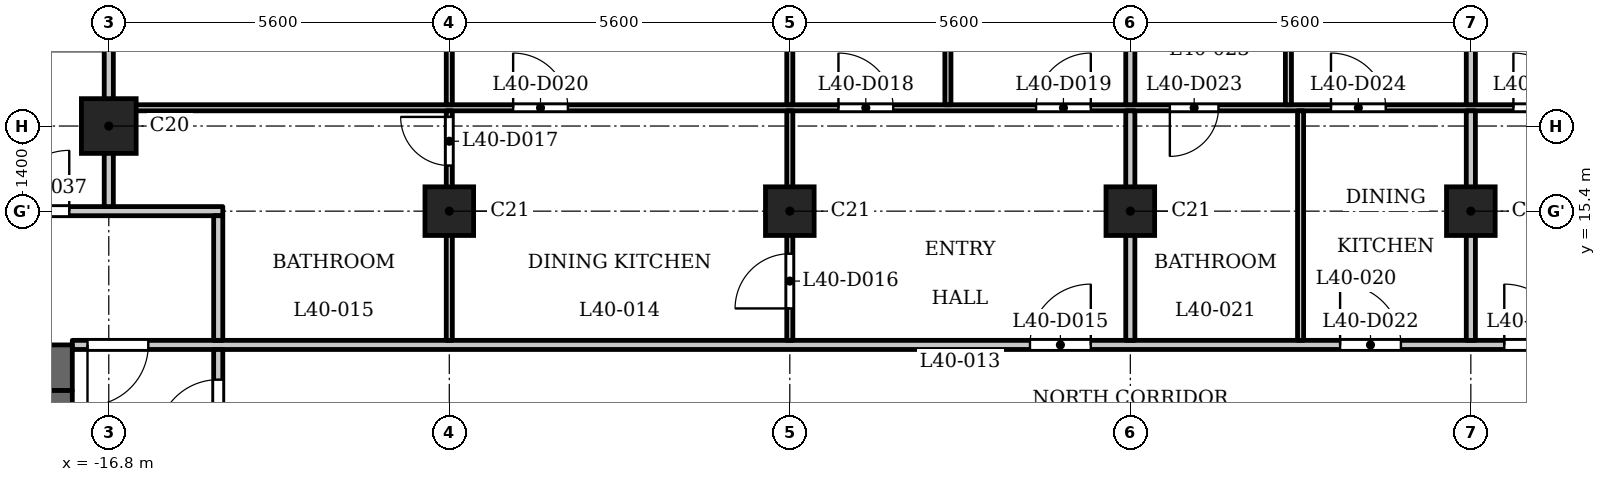
"""IFC4 building model, lengths in metres.
Left out: names, types, materials, properties, quantities, classifications, styles, units other than length and angle.
Written with IfcOpenShell. Run it as: python <this file> out.ifc"""

import sys

from ifc_helpers import new_model, si_unit, direction, frame, frame_2d, origin, origin_2d, place, context, subcontext, project, spatial, rectangle, extrude, element, fill, save


model = new_model("IFC4")
c1 = context("Model", 3, precision=1e-05, world=origin(), true_north=direction((0.0, 1.0)))
c2 = subcontext(c1, "Body", "Model", "MODEL_VIEW")
j1 = project(units=[si_unit("LENGTHUNIT", "METRE"), si_unit("PLANEANGLEUNIT", "RADIAN")], contexts=[c1])
p1 = place(None, origin())
s1 = spatial("IfcSite", under=j1, at=p1, CompositionType="ELEMENT")
p2 = place(p1, origin())
s2 = spatial("IfcBuilding", under=s1, at=p2, CompositionType="ELEMENT")
p3 = place(p2, frame((0.0, 0.0, 157.1)))
s3 = spatial("IfcBuildingStorey", under=s2, at=p3, CompositionType="ELEMENT", Elevation=157.1)
p4 = place(p3, frame((-16.8, 16.8, 0.0), z_axis=(0.0, 0.0, 1.0), x_axis=(1.0, 0.0, 0.0)))
e1 = element("IfcColumn", 1, at=p4, inside=s3, PredefinedType="COLUMN", context=c2, shape_type="SweptSolid", body=[
    extrude(rectangle(XDim=0.9, YDim=0.9, at=origin_2d()), origin(), (0.0, 0.0, 1.0), 3.5),
])
for number, where, z_axis, x_axis in (
    (2, (-11.2, 15.4, 0.0), (0.0, 0.0, 1.0), (1.0, 0.0, 0.0)),
    (3, (-5.6, 15.4, 0.0), (0.0, 0.0, 1.0), (1.0, 0.0, 0.0)),
    (4, (0.0, 15.4, 0.0), (0.0, 0.0, 1.0), (1.0, 0.0, 0.0)),
    (5, (5.6, 15.4, 0.0), (0.0, 0.0, 1.0), (1.0, 0.0, 0.0)),
):
    element("IfcColumn", number, at=place(p3, frame(where, z_axis=z_axis, x_axis=x_axis)), inside=s3, PredefinedType="COLUMN", context=c2, shape_type="SweptSolid", body=[
        extrude(rectangle(XDim=0.8, YDim=0.8, at=origin_2d()), origin(), (0.0, 0.0, 1.0), 3.5),
    ])
p5 = place(p3, frame((-17.4, 12.825, 0.0), z_axis=(0.0, 0.0, 1.0), x_axis=(-1.0, 0.0, 0.0)))
e6 = element("IfcWall", 6, at=p5, inside=s3, PredefinedType="SHEAR", context=c2, shape_type="SweptSolid", body=[
    extrude(rectangle(XDim=10.4, YDim=0.75, at=frame_2d((5.2, 0.0))), origin(), (0.0, 0.0, 1.0), 3.2),
])
p6 = place(p3, frame((-17.6, -12.45, 0.0), z_axis=(0.0, 0.0, 1.0), x_axis=(0.0, 1.0, 0.0)))
e7 = element("IfcWall", 7, at=p6, inside=s3, PredefinedType="SHEAR", context=c2, shape_type="SweptSolid", body=[
    extrude(rectangle(XDim=24.9, YDim=0.4, at=frame_2d((12.45, 0.0))), origin(), (0.0, 0.0, 1.0), 3.2),
])
p7 = place(p6, frame((8.65, 0.0, 0.0)))
e8 = element("IfcOpeningElement", 8, at=p7, cuts=e7, PredefinedType="OPENING", context=c2, shape_type="SweptSolid", body=[
    extrude(rectangle(XDim=0.9, YDim=2.1, at=frame_2d((0.45, 1.05))), frame((0.0, 0.21, 0.0), z_axis=(0.0, -1.0, 0.0), x_axis=(1.0, 0.0, 0.0)), (0.0, 0.0, 1.0), 0.42),
])
p8 = place(p6, frame((15.6, 0.0, 0.0)))
e9 = element("IfcOpeningElement", 9, at=p8, cuts=e7, PredefinedType="OPENING", context=c2, shape_type="SweptSolid", body=[
    extrude(rectangle(XDim=1.1, YDim=2.1, at=frame_2d((0.55, 1.05))), frame((0.0, 0.21, 0.0), z_axis=(0.0, -1.0, 0.0), x_axis=(1.0, 0.0, 0.0)), (0.0, 0.0, 1.0), 0.42),
])
p9 = place(p6, frame((18.0, 0.0, 0.0)))
e10 = element("IfcOpeningElement", 10, at=p9, cuts=e7, PredefinedType="OPENING", context=c2, shape_type="SweptSolid", body=[
    extrude(rectangle(XDim=1.1, YDim=2.1, at=frame_2d((0.55, 1.05))), frame((0.0, 0.21, 0.0), z_axis=(0.0, -1.0, 0.0), x_axis=(1.0, 0.0, 0.0)), (0.0, 0.0, 1.0), 0.42),
])
p10 = place(p6, frame((23.025, 0.0, 0.0)))
e11 = element("IfcOpeningElement", 11, at=p10, cuts=e7, PredefinedType="OPENING", context=c2, shape_type="SweptSolid", body=[
    extrude(rectangle(XDim=1.1, YDim=2.1, at=frame_2d((0.55, 1.05))), frame((0.0, 0.21, 0.0), z_axis=(0.0, -1.0, 0.0), x_axis=(1.0, 0.0, 0.0)), (0.0, 0.0, 1.0), 0.42),
])
p11 = place(p6, frame((0.775, 0.0, 0.0)))
e12 = element("IfcOpeningElement", 12, at=p11, cuts=e7, PredefinedType="OPENING", context=c2, shape_type="SweptSolid", body=[
    extrude(rectangle(XDim=1.1, YDim=2.1, at=frame_2d((0.55, 1.05))), frame((0.0, 0.21, 0.0), z_axis=(0.0, -1.0, 0.0), x_axis=(1.0, 0.0, 0.0)), (0.0, 0.0, 1.0), 0.42),
])
p12 = place(p6, frame((12.925, 0.0, 0.0)))
e13 = element("IfcOpeningElement", 13, at=p12, cuts=e7, PredefinedType="OPENING", context=c2, shape_type="SweptSolid", body=[
    extrude(rectangle(XDim=1.8, YDim=2.1, at=frame_2d((0.9, 1.05))), frame((0.0, 0.21, 0.0), z_axis=(0.0, -1.0, 0.0), x_axis=(1.0, 0.0, 0.0)), (0.0, 0.0, 1.0), 0.42),
])
p13 = place(p3, frame((-17.4, 13.2, 0.0), z_axis=(0.0, 0.0, 1.0), x_axis=(1.0, 0.0, 0.0)))
e14 = element("IfcWall", 14, at=p13, inside=s3, PredefinedType="PARTITIONING", context=c2, shape_type="SweptSolid", body=[
    extrude(rectangle(XDim=34.8, YDim=0.15, at=frame_2d((17.4, 0.0))), origin(), (0.0, 0.0, 1.0), 3.2),
])
p14 = place(p13, frame((0.25, 0.0, 0.0)))
e15 = element("IfcOpeningElement", 15, at=p14, cuts=e14, PredefinedType="OPENING", context=c2, shape_type="SweptSolid", body=[
    extrude(rectangle(XDim=1.0, YDim=2.1, at=frame_2d((0.5, 1.05))), frame((0.0, 0.085, 0.0), z_axis=(0.0, -1.0, 0.0), x_axis=(1.0, 0.0, 0.0)), (0.0, 0.0, 1.0), 0.17),
])
p15 = place(p13, frame((33.65, 0.0, 0.0)))
e16 = element("IfcOpeningElement", 16, at=p15, cuts=e14, PredefinedType="OPENING", context=c2, shape_type="SweptSolid", body=[
    extrude(rectangle(XDim=1.0, YDim=2.1, at=frame_2d((0.5, 1.05))), frame((0.0, 0.085, 0.0), z_axis=(0.0, -1.0, 0.0), x_axis=(1.0, 0.0, 0.0)), (0.0, 0.0, 1.0), 0.17),
])
p16 = place(p13, frame((15.75, 0.0, 0.0)))
e17 = element("IfcOpeningElement", 17, at=p16, cuts=e14, PredefinedType="OPENING", context=c2, shape_type="SweptSolid", body=[
    extrude(rectangle(XDim=1.0, YDim=2.1, at=frame_2d((0.5, 1.05))), frame((0.0, 0.085, 0.0), z_axis=(0.0, -1.0, 0.0), x_axis=(1.0, 0.0, 0.0)), (0.0, 0.0, 1.0), 0.17),
])
p17 = place(p13, frame((20.85, 0.0, 0.0)))
e18 = element("IfcOpeningElement", 18, at=p17, cuts=e14, PredefinedType="OPENING", context=c2, shape_type="SweptSolid", body=[
    extrude(rectangle(XDim=1.0, YDim=2.1, at=frame_2d((0.5, 1.05))), frame((0.0, 0.085, 0.0), z_axis=(0.0, -1.0, 0.0), x_axis=(1.0, 0.0, 0.0)), (0.0, 0.0, 1.0), 0.17),
])
p18 = place(p13, frame((23.55, 0.0, 0.0)))
e19 = element("IfcOpeningElement", 19, at=p18, cuts=e14, PredefinedType="OPENING", context=c2, shape_type="SweptSolid", body=[
    extrude(rectangle(XDim=1.0, YDim=2.1, at=frame_2d((0.5, 1.05))), frame((0.0, 0.085, 0.0), z_axis=(0.0, -1.0, 0.0), x_axis=(1.0, 0.0, 0.0)), (0.0, 0.0, 1.0), 0.17),
])
p19 = place(p3, frame((-27.484, 15.4, 0.0), z_axis=(0.0, 0.0, 1.0), x_axis=(1.0, 0.0, 0.0)))
e20 = element("IfcWall", 20, at=p19, inside=s3, PredefinedType="PARTITIONING", context=c2, shape_type="SweptSolid", body=[
    extrude(rectangle(XDim=12.559, YDim=0.15, at=frame_2d((6.279, 0.0))), origin(), (0.0, 0.0, 1.0), 3.2),
])
p20 = place(p19, frame((9.034, 0.0, 0.0)))
e21 = element("IfcOpeningElement", 21, at=p20, cuts=e20, PredefinedType="OPENING", context=c2, shape_type="SweptSolid", body=[
    extrude(rectangle(XDim=1.0, YDim=2.1, at=frame_2d((0.5, 1.05))), frame((0.0, 0.085, 0.0), z_axis=(0.0, -1.0, 0.0), x_axis=(1.0, 0.0, 0.0)), (0.0, 0.0, 1.0), 0.17),
])
p21 = place(p3, frame((-16.725, 17.1, 0.0), z_axis=(0.0, 0.0, 1.0), x_axis=(1.0, 0.0, 0.0)))
e22 = element("IfcWall", 22, at=p21, inside=s3, PredefinedType="PARTITIONING", context=c2, shape_type="SweptSolid", body=[
    extrude(rectangle(XDim=33.45, YDim=0.1, at=frame_2d((16.725, 0.0))), origin(), (0.0, 0.0, 1.0), 3.2),
])
p22 = place(p21, frame((11.925, 0.0, 0.0)))
e23 = element("IfcOpeningElement", 23, at=p22, cuts=e22, PredefinedType="OPENING", context=c2, shape_type="SweptSolid", body=[
    extrude(rectangle(XDim=0.9, YDim=2.1, at=frame_2d((0.45, 1.05))), frame((0.0, 0.06, 0.0), z_axis=(0.0, -1.0, 0.0), x_axis=(1.0, 0.0, 0.0)), (0.0, 0.0, 1.0), 0.12),
])
p23 = place(p21, frame((15.175, 0.0, 0.0)))
e24 = element("IfcOpeningElement", 24, at=p23, cuts=e22, PredefinedType="OPENING", context=c2, shape_type="SweptSolid", body=[
    extrude(rectangle(XDim=0.9, YDim=2.1, at=frame_2d((0.45, 1.05))), frame((0.0, 0.06, 0.0), z_axis=(0.0, -1.0, 0.0), x_axis=(1.0, 0.0, 0.0)), (0.0, 0.0, 1.0), 0.12),
])
p24 = place(p21, frame((6.575, 0.0, 0.0)))
e25 = element("IfcOpeningElement", 25, at=p24, cuts=e22, PredefinedType="OPENING", context=c2, shape_type="SweptSolid", body=[
    extrude(rectangle(XDim=0.9, YDim=2.1, at=frame_2d((0.45, 1.05))), frame((0.0, 0.06, 0.0), z_axis=(0.0, -1.0, 0.0), x_axis=(1.0, 0.0, 0.0)), (0.0, 0.0, 1.0), 0.12),
])
p25 = place(p21, frame((17.375, 0.0, 0.0)))
e26 = element("IfcOpeningElement", 26, at=p25, cuts=e22, PredefinedType="OPENING", context=c2, shape_type="SweptSolid", body=[
    extrude(rectangle(XDim=0.8, YDim=2.1, at=frame_2d((0.4, 1.05))), frame((0.0, 0.06, 0.0), z_axis=(0.0, -1.0, 0.0), x_axis=(1.0, 0.0, 0.0)), (0.0, 0.0, 1.0), 0.12),
])
p26 = place(p21, frame((20.025, 0.0, 0.0)))
e27 = element("IfcOpeningElement", 27, at=p26, cuts=e22, PredefinedType="OPENING", context=c2, shape_type="SweptSolid", body=[
    extrude(rectangle(XDim=0.9, YDim=2.1, at=frame_2d((0.45, 1.05))), frame((0.0, 0.06, 0.0), z_axis=(0.0, -1.0, 0.0), x_axis=(1.0, 0.0, 0.0)), (0.0, 0.0, 1.0), 0.12),
])
p27 = place(p21, frame((26.425, 0.0, 0.0)))
e28 = element("IfcOpeningElement", 28, at=p27, cuts=e22, PredefinedType="OPENING", context=c2, shape_type="SweptSolid", body=[
    extrude(rectangle(XDim=0.8, YDim=2.1, at=frame_2d((0.4, 1.05))), frame((0.0, 0.06, 0.0), z_axis=(0.0, -1.0, 0.0), x_axis=(1.0, 0.0, 0.0)), (0.0, 0.0, 1.0), 0.12),
])
p28 = place(p21, frame((23.025, 0.0, 0.0)))
e29 = element("IfcOpeningElement", 29, at=p28, cuts=e22, PredefinedType="OPENING", context=c2, shape_type="SweptSolid", body=[
    extrude(rectangle(XDim=0.9, YDim=2.1, at=frame_2d((0.45, 1.05))), frame((0.0, 0.06, 0.0), z_axis=(0.0, -1.0, 0.0), x_axis=(1.0, 0.0, 0.0)), (0.0, 0.0, 1.0), 0.12),
])
p29 = place(p21, frame((28.575, 0.0, 0.0)))
e30 = element("IfcOpeningElement", 30, at=p29, cuts=e22, PredefinedType="OPENING", context=c2, shape_type="SweptSolid", body=[
    extrude(rectangle(XDim=0.8, YDim=2.1, at=frame_2d((0.4, 1.05))), frame((0.0, 0.06, 0.0), z_axis=(0.0, -1.0, 0.0), x_axis=(1.0, 0.0, 0.0)), (0.0, 0.0, 1.0), 0.12),
])
p30 = place(p21, frame((30.725, 0.0, 0.0)))
e31 = element("IfcOpeningElement", 31, at=p30, cuts=e22, PredefinedType="OPENING", context=c2, shape_type="SweptSolid", body=[
    extrude(rectangle(XDim=0.9, YDim=2.1, at=frame_2d((0.45, 1.05))), frame((0.0, 0.06, 0.0), z_axis=(0.0, -1.0, 0.0), x_axis=(1.0, 0.0, 0.0)), (0.0, 0.0, 1.0), 0.12),
])
p31 = place(p3, frame((-16.8, 15.475, 0.0), z_axis=(0.0, 0.0, 1.0), x_axis=(0.0, 1.0, 0.0)))
e32 = element("IfcWall", 32, at=p31, inside=s3, PredefinedType="PARTITIONING", context=c2, shape_type="SweptSolid", body=[
    extrude(rectangle(XDim=7.455, YDim=0.15, at=frame_2d((3.728, 0.0))), origin(), (0.0, 0.0, 1.0), 3.2),
])
p32 = place(p3, frame((-15.0, 6.769, 0.0), z_axis=(0.0, 0.0, 1.0), x_axis=(0.0, 1.0, 0.0)))
e33 = element("IfcWall", 33, at=p32, inside=s3, PredefinedType="PARTITIONING", context=c2, shape_type="SweptSolid", body=[
    extrude(rectangle(XDim=6.356, YDim=0.15, at=frame_2d((3.178, 0.0))), origin(), (0.0, 0.0, 1.0), 3.2),
])
p33 = place(p32, frame((4.86, 0.0, 0.0)))
e34 = element("IfcOpeningElement", 34, at=p33, cuts=e33, PredefinedType="OPENING", context=c2, shape_type="SweptSolid", body=[
    extrude(rectangle(XDim=1.0, YDim=2.1, at=frame_2d((0.5, 1.05))), frame((0.0, 0.085, 0.0), z_axis=(0.0, -1.0, 0.0), x_axis=(1.0, 0.0, 0.0)), (0.0, 0.0, 1.0), 0.17),
])
p34 = place(p3, frame((-15.0, 13.275, 0.0), z_axis=(0.0, 0.0, 1.0), x_axis=(0.0, 1.0, 0.0)))
e35 = element("IfcWall", 35, at=p34, inside=s3, PredefinedType="PARTITIONING", context=c2, shape_type="SweptSolid", body=[
    extrude(rectangle(XDim=2.05, YDim=0.15, at=frame_2d((1.025, 0.0))), origin(), (0.0, 0.0, 1.0), 3.2),
])
p35 = place(p3, frame((-11.2, 13.275, 0.0), z_axis=(0.0, 0.0, 1.0), x_axis=(0.0, 1.0, 0.0)))
e36 = element("IfcWall", 36, at=p35, inside=s3, PredefinedType="PARTITIONING", context=c2, shape_type="SweptSolid", body=[
    extrude(rectangle(XDim=3.775, YDim=0.1, at=frame_2d((1.888, 0.0))), origin(), (0.0, 0.0, 1.0), 3.2),
])
p36 = place(p35, frame((2.875, 0.0, 0.0)))
e37 = element("IfcOpeningElement", 37, at=p36, cuts=e36, PredefinedType="OPENING", context=c2, shape_type="SweptSolid", body=[
    extrude(rectangle(XDim=0.8, YDim=2.1, at=frame_2d((0.4, 1.05))), frame((0.0, 0.06, 0.0), z_axis=(0.0, -1.0, 0.0), x_axis=(1.0, 0.0, 0.0)), (0.0, 0.0, 1.0), 0.12),
])
p37 = place(p3, frame((-11.2, 17.15, 0.0), z_axis=(0.0, 0.0, 1.0), x_axis=(0.0, 1.0, 0.0)))
e38 = element("IfcWall", 38, at=p37, inside=s3, PredefinedType="PARTITIONING", context=c2, shape_type="SweptSolid", body=[
    extrude(rectangle(XDim=5.78, YDim=0.1, at=frame_2d((2.89, 0.0))), origin(), (0.0, 0.0, 1.0), 3.2),
])
p38 = place(p37, frame((3.61, 0.0, 0.0)))
e39 = element("IfcOpeningElement", 39, at=p38, cuts=e38, PredefinedType="OPENING", context=c2, shape_type="SweptSolid", body=[
    extrude(rectangle(XDim=0.9, YDim=2.1, at=frame_2d((0.45, 1.05))), frame((0.0, 0.06, 0.0), z_axis=(0.0, -1.0, 0.0), x_axis=(1.0, 0.0, 0.0)), (0.0, 0.0, 1.0), 0.12),
])
p39 = place(p3, frame((-5.6, 13.275, 0.0), z_axis=(0.0, 0.0, 1.0), x_axis=(0.0, 1.0, 0.0)))
e40 = element("IfcWall", 40, at=p39, inside=s3, PredefinedType="PARTITIONING", context=c2, shape_type="SweptSolid", body=[
    extrude(rectangle(XDim=3.775, YDim=0.1, at=frame_2d((1.888, 0.0))), origin(), (0.0, 0.0, 1.0), 3.2),
])
p40 = place(p39, frame((0.525, 0.0, 0.0)))
e41 = element("IfcOpeningElement", 41, at=p40, cuts=e40, PredefinedType="OPENING", context=c2, shape_type="SweptSolid", body=[
    extrude(rectangle(XDim=0.9, YDim=2.1, at=frame_2d((0.45, 1.05))), frame((0.0, 0.06, 0.0), z_axis=(0.0, -1.0, 0.0), x_axis=(1.0, 0.0, 0.0)), (0.0, 0.0, 1.0), 0.12),
])
p41 = place(p3, frame((-5.6, 17.15, 0.0), z_axis=(0.0, 0.0, 1.0), x_axis=(0.0, 1.0, 0.0)))
e42 = element("IfcWall", 42, at=p41, inside=s3, PredefinedType="PARTITIONING", context=c2, shape_type="SweptSolid", body=[
    extrude(rectangle(XDim=5.78, YDim=0.1, at=frame_2d((2.89, 0.0))), origin(), (0.0, 0.0, 1.0), 3.2),
])
p42 = place(p3, frame((-3.0, 17.15, 0.0), z_axis=(0.0, 0.0, 1.0), x_axis=(0.0, 1.0, 0.0)))
e43 = element("IfcWall", 43, at=p42, inside=s3, PredefinedType="PARTITIONING", context=c2, shape_type="SweptSolid", body=[
    extrude(rectangle(XDim=4.93, YDim=0.1, at=frame_2d((2.465, 0.0))), origin(), (0.0, 0.0, 1.0), 3.2),
])
p43 = place(p3, frame((0.0, 13.275, 0.0), z_axis=(0.0, 0.0, 1.0), x_axis=(0.0, 1.0, 0.0)))
e44 = element("IfcWall", 44, at=p43, inside=s3, PredefinedType="PARTITIONING", context=c2, shape_type="SweptSolid", body=[
    extrude(rectangle(XDim=3.775, YDim=0.15, at=frame_2d((1.888, 0.0))), origin(), (0.0, 0.0, 1.0), 3.2),
])
p44 = place(p3, frame((0.0, 17.15, 0.0), z_axis=(0.0, 0.0, 1.0), x_axis=(0.0, 1.0, 0.0)))
e45 = element("IfcWall", 45, at=p44, inside=s3, PredefinedType="PARTITIONING", context=c2, shape_type="SweptSolid", body=[
    extrude(rectangle(XDim=5.78, YDim=0.15, at=frame_2d((2.89, 0.0))), origin(), (0.0, 0.0, 1.0), 3.2),
])
p45 = place(p3, frame((2.6, 17.15, 0.0), z_axis=(0.0, 0.0, 1.0), x_axis=(0.0, 1.0, 0.0)))
e46 = element("IfcWall", 46, at=p45, inside=s3, PredefinedType="PARTITIONING", context=c2, shape_type="SweptSolid", body=[
    extrude(rectangle(XDim=4.93, YDim=0.1, at=frame_2d((2.465, 0.0))), origin(), (0.0, 0.0, 1.0), 3.2),
])
p46 = place(p45, frame((3.61, 0.0, 0.0)))
e47 = element("IfcOpeningElement", 47, at=p46, cuts=e46, PredefinedType="OPENING", context=c2, shape_type="SweptSolid", body=[
    extrude(rectangle(XDim=0.9, YDim=2.1, at=frame_2d((0.45, 1.05))), frame((0.0, 0.06, 0.0), z_axis=(0.0, -1.0, 0.0), x_axis=(1.0, 0.0, 0.0)), (0.0, 0.0, 1.0), 0.12),
])
p47 = place(p3, frame((2.8, 13.275, 0.0), z_axis=(0.0, 0.0, 1.0), x_axis=(0.0, 1.0, 0.0)))
e48 = element("IfcWall", 48, at=p47, inside=s3, PredefinedType="PARTITIONING", context=c2, shape_type="SweptSolid", body=[
    extrude(rectangle(XDim=3.775, YDim=0.1, at=frame_2d((1.888, 0.0))), origin(), (0.0, 0.0, 1.0), 3.2),
])
p48 = place(p3, frame((5.6, 13.275, 0.0), z_axis=(0.0, 0.0, 1.0), x_axis=(0.0, 1.0, 0.0)))
e49 = element("IfcWall", 49, at=p48, inside=s3, PredefinedType="PARTITIONING", context=c2, shape_type="SweptSolid", body=[
    extrude(rectangle(XDim=3.775, YDim=0.15, at=frame_2d((1.888, 0.0))), origin(), (0.0, 0.0, 1.0), 3.2),
])
p49 = place(p3, frame((5.6, 17.15, 0.0), z_axis=(0.0, 0.0, 1.0), x_axis=(0.0, 1.0, 0.0)))
e50 = element("IfcWall", 50, at=p49, inside=s3, PredefinedType="PARTITIONING", context=c2, shape_type="SweptSolid", body=[
    extrude(rectangle(XDim=5.78, YDim=0.15, at=frame_2d((2.89, 0.0))), origin(), (0.0, 0.0, 1.0), 3.2),
])
p50 = place(p33, origin())
e51 = element("IfcDoor", 51, at=p50, inside=s3, OperationType="SINGLE_SWING_RIGHT", PredefinedType="DOOR", context=c2, shape_type="SweptSolid", body=[
    extrude(rectangle(XDim=1.0, YDim=2.1, at=frame_2d((0.5, 1.05))), frame((0.0, 0.025, 0.0), z_axis=(0.0, -1.0, 0.0), x_axis=(1.0, 0.0, 0.0)), (0.0, 0.0, 1.0), 0.05),
])
fill(e34, e51)
p51 = place(p14, origin())
e52 = element("IfcDoor", 52, at=p51, inside=s3, OperationType="SINGLE_SWING_LEFT", PredefinedType="DOOR", context=c2, shape_type="SweptSolid", body=[
    extrude(rectangle(XDim=1.0, YDim=2.1, at=frame_2d((0.5, 1.05))), frame((0.0, 0.025, 0.0), z_axis=(0.0, -1.0, 0.0), x_axis=(1.0, 0.0, 0.0)), (0.0, 0.0, 1.0), 0.05),
])
fill(e15, e52)
p52 = place(p16, origin())
e53 = element("IfcDoor", 53, at=p52, inside=s3, OperationType="SINGLE_SWING_LEFT", PredefinedType="DOOR", context=c2, shape_type="SweptSolid", body=[
    extrude(rectangle(XDim=1.0, YDim=2.1, at=frame_2d((0.5, 1.05))), frame((0.0, 0.025, 0.0), z_axis=(0.0, -1.0, 0.0), x_axis=(1.0, 0.0, 0.0)), (0.0, 0.0, 1.0), 0.05),
])
fill(e17, e53)
p53 = place(p40, origin())
e54 = element("IfcDoor", 54, at=p53, inside=s3, OperationType="SINGLE_SWING_RIGHT", PredefinedType="DOOR", context=c2, shape_type="SweptSolid", body=[
    extrude(rectangle(XDim=0.9, YDim=2.1, at=frame_2d((0.45, 1.05))), frame((0.0, 0.025, 0.0), z_axis=(0.0, -1.0, 0.0), x_axis=(1.0, 0.0, 0.0)), (0.0, 0.0, 1.0), 0.05),
])
fill(e41, e54)
p54 = place(p36, origin())
e55 = element("IfcDoor", 55, at=p54, inside=s3, OperationType="SINGLE_SWING_LEFT", PredefinedType="DOOR", context=c2, shape_type="SweptSolid", body=[
    extrude(rectangle(XDim=0.8, YDim=2.1, at=frame_2d((0.4, 1.05))), frame((0.0, 0.025, 0.0), z_axis=(0.0, -1.0, 0.0), x_axis=(1.0, 0.0, 0.0)), (0.0, 0.0, 1.0), 0.05),
])
fill(e37, e55)
p55 = place(p22, origin())
e56 = element("IfcDoor", 56, at=p55, inside=s3, OperationType="SINGLE_SWING_RIGHT", PredefinedType="DOOR", context=c2, shape_type="SweptSolid", body=[
    extrude(rectangle(XDim=0.9, YDim=2.1, at=frame_2d((0.45, 1.05))), frame((0.0, 0.025, 0.0), z_axis=(0.0, -1.0, 0.0), x_axis=(1.0, 0.0, 0.0)), (0.0, 0.0, 1.0), 0.05),
])
fill(e23, e56)
p56 = place(p23, origin())
e57 = element("IfcDoor", 57, at=p56, inside=s3, OperationType="SINGLE_SWING_LEFT", PredefinedType="DOOR", context=c2, shape_type="SweptSolid", body=[
    extrude(rectangle(XDim=0.9, YDim=2.1, at=frame_2d((0.45, 1.05))), frame((0.0, 0.025, 0.0), z_axis=(0.0, -1.0, 0.0), x_axis=(1.0, 0.0, 0.0)), (0.0, 0.0, 1.0), 0.05),
])
fill(e24, e57)
p57 = place(p24, origin())
e58 = element("IfcDoor", 58, at=p57, inside=s3, OperationType="SINGLE_SWING_RIGHT", PredefinedType="DOOR", context=c2, shape_type="SweptSolid", body=[
    extrude(rectangle(XDim=0.9, YDim=2.1, at=frame_2d((0.45, 1.05))), frame((0.0, 0.025, 0.0), z_axis=(0.0, -1.0, 0.0), x_axis=(1.0, 0.0, 0.0)), (0.0, 0.0, 1.0), 0.05),
])
fill(e25, e58)
p58 = place(p17, origin())
e59 = element("IfcDoor", 59, at=p58, inside=s3, OperationType="SINGLE_SWING_RIGHT", PredefinedType="DOOR", context=c2, shape_type="SweptSolid", body=[
    extrude(rectangle(XDim=1.0, YDim=2.1, at=frame_2d((0.5, 1.05))), frame((0.0, 0.025, 0.0), z_axis=(0.0, -1.0, 0.0), x_axis=(1.0, 0.0, 0.0)), (0.0, 0.0, 1.0), 0.05),
])
fill(e18, e59)
p59 = place(p25, origin())
e60 = element("IfcDoor", 60, at=p59, inside=s3, OperationType="SINGLE_SWING_LEFT", PredefinedType="DOOR", context=c2, shape_type="SweptSolid", body=[
    extrude(rectangle(XDim=0.8, YDim=2.1, at=frame_2d((0.4, 1.05))), frame((0.0, 0.025, 0.0), z_axis=(0.0, -1.0, 0.0), x_axis=(1.0, 0.0, 0.0)), (0.0, 0.0, 1.0), 0.05),
])
fill(e26, e60)
p60 = place(p26, origin())
e61 = element("IfcDoor", 61, at=p60, inside=s3, OperationType="SINGLE_SWING_RIGHT", PredefinedType="DOOR", context=c2, shape_type="SweptSolid", body=[
    extrude(rectangle(XDim=0.9, YDim=2.1, at=frame_2d((0.45, 1.05))), frame((0.0, 0.025, 0.0), z_axis=(0.0, -1.0, 0.0), x_axis=(1.0, 0.0, 0.0)), (0.0, 0.0, 1.0), 0.05),
])
fill(e27, e61)
p61 = place(p18, origin())
e62 = element("IfcDoor", 62, at=p61, inside=s3, OperationType="SINGLE_SWING_RIGHT", PredefinedType="DOOR", context=c2, shape_type="SweptSolid", body=[
    extrude(rectangle(XDim=1.0, YDim=2.1, at=frame_2d((0.5, 1.05))), frame((0.0, 0.025, 0.0), z_axis=(0.0, -1.0, 0.0), x_axis=(1.0, 0.0, 0.0)), (0.0, 0.0, 1.0), 0.05),
])
fill(e19, e62)
p62 = place(p28, origin())
e63 = element("IfcDoor", 63, at=p62, inside=s3, OperationType="SINGLE_SWING_RIGHT", PredefinedType="DOOR", context=c2, shape_type="SweptSolid", body=[
    extrude(rectangle(XDim=0.9, YDim=2.1, at=frame_2d((0.45, 1.05))), frame((0.0, 0.025, 0.0), z_axis=(0.0, -1.0, 0.0), x_axis=(1.0, 0.0, 0.0)), (0.0, 0.0, 1.0), 0.05),
])
fill(e29, e63)
p63 = place(p20, origin())
e64 = element("IfcDoor", 64, at=p63, inside=s3, OperationType="SINGLE_SWING_LEFT", PredefinedType="DOOR", context=c2, shape_type="SweptSolid", body=[
    extrude(rectangle(XDim=1.0, YDim=2.1, at=frame_2d((0.5, 1.05))), frame((0.0, 0.025, 0.0), z_axis=(0.0, -1.0, 0.0), x_axis=(1.0, 0.0, 0.0)), (0.0, 0.0, 1.0), 0.05),
])
fill(e21, e64)
save(model, sys.argv[1])
